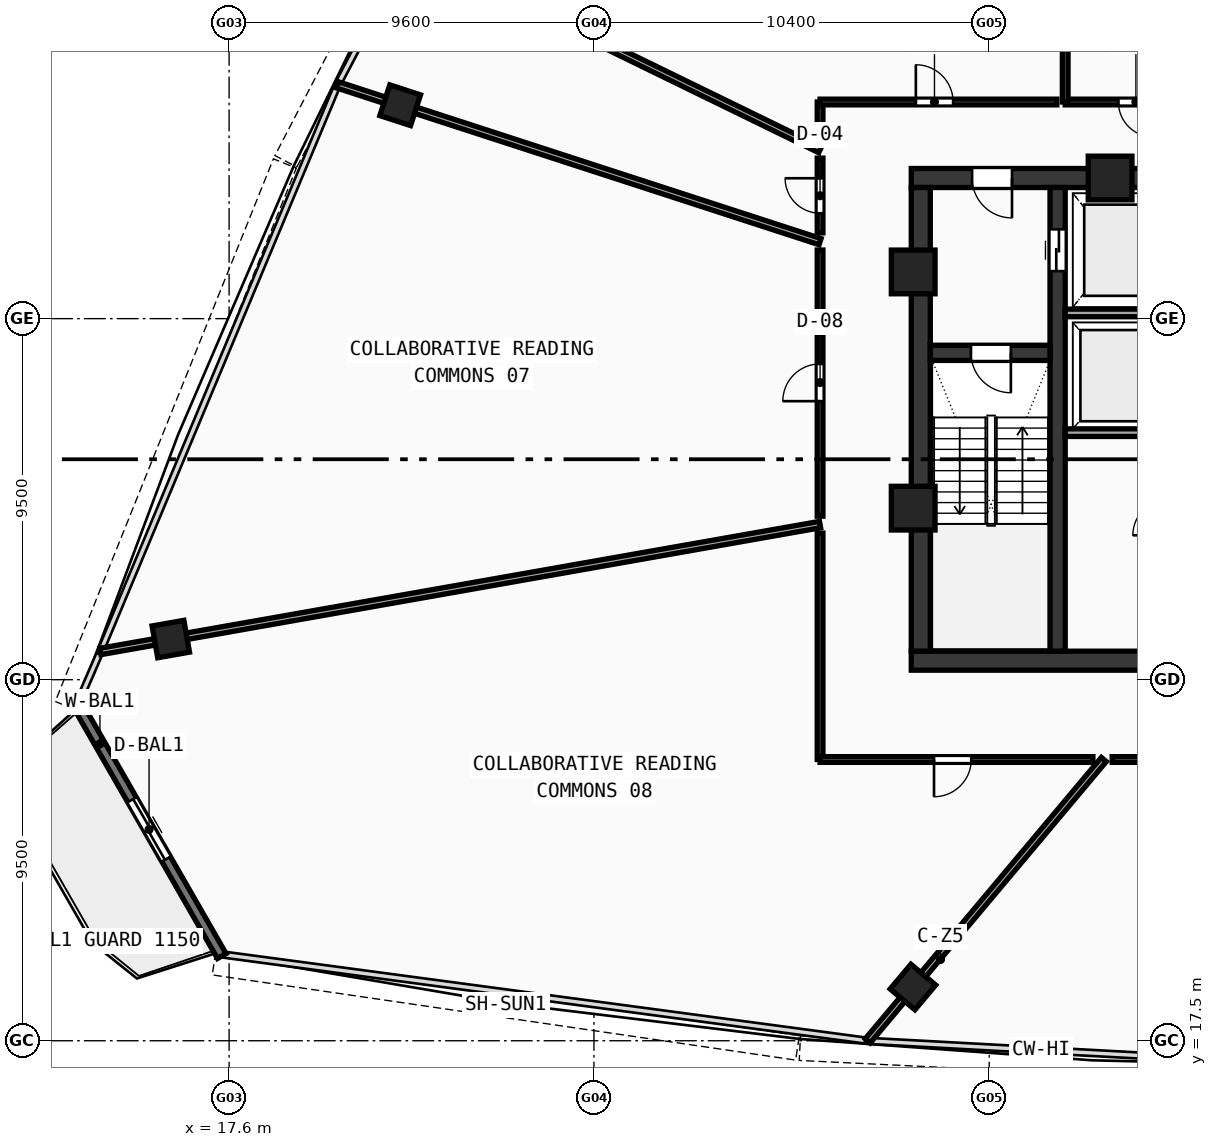
"""IFC4 building model, lengths in metres.
Left out: names, types, materials, properties, quantities, classifications, styles, units other than length and angle.
Written with IfcOpenShell. Run it as: python <this file> out.ifc"""

import sys

from ifc_helpers import new_model, si_unit, direction, frame, frame_2d, origin, origin_with_axes, origin_2d, place, context, subcontext, project, spatial, rectangle, hollow_rectangle, extrude, source, transform, mapped, element, fill, save


model = new_model("IFC4")
c1 = context("Model", 3, precision=1e-05, world=origin(), true_north=direction((0.0, 1.0)))
c2 = subcontext(c1, "Body", "Model", "MODEL_VIEW")
j1 = project(units=[si_unit("LENGTHUNIT", "METRE"), si_unit("PLANEANGLEUNIT", "RADIAN")], contexts=[c1])
p1 = place(None, origin())
s1 = spatial("IfcSite", under=j1, at=p1, CompositionType="ELEMENT")
p2 = place(p1, origin())
s2 = spatial("IfcBuilding", under=s1, at=p2, CompositionType="ELEMENT")
p3 = place(p2, frame((0.0, 0.0, 259.45)))
s3 = spatial("IfcBuildingStorey", under=s2, at=p3, CompositionType="ELEMENT", Elevation=259.45)
p4 = place(p3, frame((35.55, 27.5, 0.0), z_axis=(0.0, 0.0, 1.0), x_axis=(1.0, 0.0, 0.0)))
e1 = element("IfcWall", 1, at=p4, inside=s3, PredefinedType="SHEAR", context=c2, shape_type="SweptSolid", body=[
    extrude(rectangle(XDim=24.9, YDim=0.5, at=frame_2d((12.45, 0.0))), origin(), (0.0, 0.0, 1.0), 3.47),
])
p5 = place(p3, frame((35.55, 40.2, 0.0), z_axis=(0.0, 0.0, 1.0), x_axis=(1.0, 0.0, 0.0)))
e2 = element("IfcWall", 2, at=p5, inside=s3, PredefinedType="SHEAR", context=c2, shape_type="SweptSolid", body=[
    extrude(rectangle(XDim=11.25, YDim=0.5, at=frame_2d((5.625, 0.0))), origin(), (0.0, 0.0, 1.0), 3.47),
])
p6 = place(p5, frame((1.6, 0.0, 0.0)))
e3 = element("IfcOpeningElement", 3, at=p6, cuts=e2, PredefinedType="OPENING", context=c2, shape_type="SweptSolid", body=[
    extrude(rectangle(XDim=1.05, YDim=2.1, at=frame_2d((0.525, 1.05))), frame((0.0, 0.26, 0.0), z_axis=(0.0, -1.0, 0.0), x_axis=(1.0, 0.0, 0.0)), (0.0, 0.0, 1.0), 0.52),
])
p7 = place(p3, frame((35.8, 27.75, 0.0), z_axis=(0.0, 0.0, 1.0), x_axis=(0.0, 1.0, 0.0)))
e4 = element("IfcWall", 4, at=p7, inside=s3, PredefinedType="SHEAR", context=c2, shape_type="SweptSolid", body=[
    extrude(rectangle(XDim=12.2, YDim=0.5, at=frame_2d((6.1, 0.0))), origin(), (0.0, 0.0, 1.0), 3.47),
])
p8 = place(p3, frame((39.4, 27.75, 0.0), z_axis=(0.0, 0.0, 1.0), x_axis=(0.0, 1.0, 0.0)))
e5 = element("IfcWall", 5, at=p8, inside=s3, PredefinedType="SHEAR", context=c2, shape_type="SweptSolid", body=[
    extrude(rectangle(XDim=12.2, YDim=0.4, at=frame_2d((6.1, 0.0))), origin(), (0.0, 0.0, 1.0), 3.47),
])
p9 = place(p8, frame((10.0, 0.0, 0.0)))
e6 = element("IfcOpeningElement", 6, at=p9, cuts=e5, PredefinedType="OPENING", context=c2, shape_type="SweptSolid", body=[
    extrude(rectangle(XDim=1.1, YDim=2.1, at=frame_2d((0.55, 1.05))), frame((0.0, 0.21, 0.0), z_axis=(0.0, -1.0, 0.0), x_axis=(1.0, 0.0, 0.0)), (0.0, 0.0, 1.0), 0.42),
])
p10 = place(p3, frame((36.05, 35.6, 0.0), z_axis=(0.0, 0.0, 1.0), x_axis=(1.0, 0.0, 0.0)))
e7 = element("IfcWall", 7, at=p10, inside=s3, PredefinedType="SHEAR", context=c2, shape_type="SweptSolid", body=[
    extrude(rectangle(XDim=3.15, YDim=0.4, at=frame_2d((1.575, 0.0))), origin(), (0.0, 0.0, 1.0), 3.47),
])
p11 = place(p10, frame((1.07, 0.0, 0.0)))
e8 = element("IfcOpeningElement", 8, at=p11, cuts=e7, PredefinedType="OPENING", context=c2, shape_type="SweptSolid", body=[
    extrude(rectangle(XDim=1.05, YDim=2.1, at=frame_2d((0.525, 1.05))), frame((0.0, 0.21, 0.0), z_axis=(0.0, -1.0, 0.0), x_axis=(1.0, 0.0, 0.0)), (0.0, 0.0, 1.0), 0.42),
])
m1 = source(origin(), c2, "Body", "SweptSolid", [
    extrude(hollow_rectangle(XDim=1.15, YDim=1.15, WallThickness=0.048, at=origin_2d()), origin(), (0.0, 0.0, 1.0), 3.73),
])
for number, where, z_axis, x_axis in (
    (9, (40.781, 40.2, -0.26), (0.0, 0.0, 1.0), (1.0, 0.0, 0.0)),
    (10, (35.6, 37.729, -0.26), (0.0, 0.0, 1.0), (1.0, 0.0, 0.0)),
    (11, (35.6, 31.513, -0.26), (0.0, 0.0, 1.0), (1.0, 0.0, 0.0)),
):
    element("IfcColumn", number, at=place(p3, frame(where, z_axis=z_axis, x_axis=x_axis)), inside=s3, PredefinedType="COLUMN", context=c2, shape_type="MappedRepresentation", body=[
        mapped(m1, transform((0.0, 0.0, 0.0), scale=1.0)),
    ])
m2 = source(origin(), c2, "Body", "SweptSolid", [
    extrude(hollow_rectangle(XDim=0.85, YDim=0.85, WallThickness=0.034, at=origin_2d()), origin(), (0.0, 0.0, 1.0), 3.73),
])
for number, where, z_axis, x_axis in (
    (12, (35.593, 18.914, -0.26), (0.0, 0.0, 1.0), (0.766, -0.643, 0.0)),
    (13, (22.102, 42.115, -0.26), (0.0, 0.0, 1.0), (-0.309, -0.951, 0.0)),
    (14, (16.066, 28.069, -0.26), (0.0, 0.0, 1.0), (0.174, -0.985, 0.0)),
):
    element("IfcColumn", number, at=place(p3, frame(where, z_axis=z_axis, x_axis=x_axis)), inside=s3, PredefinedType="COLUMN", context=c2, shape_type="MappedRepresentation", body=[
        mapped(m2, transform((0.0, 0.0, 0.0), scale=1.0)),
    ])
p12 = place(p3, frame((13.581, 26.392, 0.0), z_axis=(0.0, 0.0, 1.0), x_axis=(0.497934343816, -0.867214730761, 0.0)))
e15 = element("IfcWall", 15, at=p12, inside=s3, PredefinedType="STANDARD", context=c2, shape_type="SweptSolid", body=[
    extrude(rectangle(XDim=7.684, YDim=0.26, at=frame_2d((3.842, 0.0))), origin(), (0.0, 0.0, 1.0), 3.47),
])
p13 = place(p12, frame((2.942, 0.0, 0.0)))
e16 = element("IfcOpeningElement", 16, at=p13, cuts=e15, PredefinedType="OPENING", context=c2, shape_type="SweptSolid", body=[
    extrude(rectangle(XDim=1.8, YDim=2.15, at=frame_2d((0.9, 1.075))), frame((0.0, 0.14, 0.0), z_axis=(0.0, -1.0, 0.0), x_axis=(1.0, 0.0, 0.0)), (0.0, 0.0, 1.0), 0.28),
])
for number, where, z_axis, x_axis in (
    (17, (39.6, 36.65, 0.0), (0.0, 0.0, 1.0), (1.0, 0.0, 0.0)),
    (18, (39.6, 33.5, 0.0), (0.0, 0.0, 1.0), (1.0, 0.0, 0.0)),
):
    element("IfcWall", number, at=place(p3, frame(where, z_axis=z_axis, x_axis=x_axis)), inside=s3, PredefinedType="SOLIDWALL", context=c2, shape_type="SweptSolid", body=[
        extrude(rectangle(XDim=2.72, YDim=0.2, at=frame_2d((1.36, 0.0))), origin(), (0.0, 0.0, 1.0), 3.47),
    ])
p14 = place(p3, frame((39.6, 42.2, 0.0), z_axis=(0.0, 0.0, 1.0), x_axis=(1.0, 0.0, 0.0)))
e19 = element("IfcWall", 19, at=p14, inside=s3, PredefinedType="PARTITIONING", context=c2, shape_type="SweptSolid", body=[
    extrude(rectangle(XDim=4.35, YDim=0.15, at=frame_2d((2.175, 0.0))), origin(), (0.0, 0.0, 1.0), 3.47),
])
p15 = place(p14, frame((1.4, 0.0, 0.0)))
e20 = element("IfcOpeningElement", 20, at=p15, cuts=e19, PredefinedType="OPENING", context=c2, shape_type="SweptSolid", body=[
    extrude(rectangle(XDim=0.92, YDim=2.1, at=frame_2d((0.46, 1.05))), frame((0.0, 0.085, 0.0), z_axis=(0.0, -1.0, 0.0), x_axis=(1.0, 0.0, 0.0)), (0.0, 0.0, 1.0), 0.17),
])
p16 = place(p3, frame((39.6, 42.2, 0.0), z_axis=(0.0, 0.0, 1.0), x_axis=(0.0, 1.0, 0.0)))
e21 = element("IfcWall", 21, at=p16, inside=s3, PredefinedType="PARTITIONING", context=c2, shape_type="SweptSolid", body=[
    extrude(rectangle(XDim=4.0, YDim=0.15, at=frame_2d((2.0, 0.0))), origin(), (0.0, 0.0, 1.0), 3.47),
])
p17 = place(p3, frame((33.15, 40.943, 0.0), z_axis=(0.0, 0.0, 1.0), x_axis=(-0.89879494126, 0.438369311842, 0.0)))
e22 = element("IfcWall", 22, at=p17, inside=s3, PredefinedType="PARTITIONING", context=c2, shape_type="SweptSolid", body=[
    extrude(rectangle(XDim=12.043, YDim=0.17, at=frame_2d((6.021, 0.0))), origin(), (0.0, 0.0, 1.0), 2.82),
])
p18 = place(p3, frame((33.15, 38.525, 0.0), z_axis=(0.0, 0.0, 1.0), x_axis=(-0.951055435747, 0.30902031994, 0.0)))
e23 = element("IfcWall", 23, at=p18, inside=s3, PredefinedType="PARTITIONING", context=c2, shape_type="SweptSolid", body=[
    extrude(rectangle(XDim=13.349, YDim=0.17, at=frame_2d((6.675, 0.0))), origin(), (0.0, 0.0, 1.0), 2.82),
])
p19 = place(p3, frame((33.15, 31.082, 0.0), z_axis=(0.0, 0.0, 1.0), x_axis=(-0.984808346381, -0.173644812474, 0.0)))
e24 = element("IfcWall", 24, at=p19, inside=s3, PredefinedType="PARTITIONING", context=c2, shape_type="SweptSolid", body=[
    extrude(rectangle(XDim=19.228, YDim=0.17, at=frame_2d((9.614, 0.0))), origin(), (0.0, 0.0, 1.0), 2.82),
])
p20 = place(p3, frame((40.616, 24.9, 0.0), z_axis=(0.0, 0.0, 1.0), x_axis=(-0.642795010628, -0.766038232931, 0.0)))
e25 = element("IfcWall", 25, at=p20, inside=s3, PredefinedType="PARTITIONING", context=c2, shape_type="SweptSolid", body=[
    extrude(rectangle(XDim=9.663, YDim=0.17, at=frame_2d((4.832, 0.0))), origin(), (0.0, 0.0, 1.0), 2.82),
])
p21 = place(p3, frame((33.15, 24.9, 0.0), z_axis=(0.0, 0.0, 1.0), x_axis=(0.0, 1.0, 0.0)))
e26 = element("IfcWall", 26, at=p21, inside=s3, PredefinedType="PARTITIONING", context=c2, shape_type="SweptSolid", body=[
    extrude(rectangle(XDim=5.958, YDim=0.15, at=frame_2d((2.979, 0.0))), origin(), (0.0, 0.0, 1.0), 3.12),
])
p22 = place(p3, frame((33.15, 31.301, 0.0), z_axis=(0.0, 0.0, 1.0), x_axis=(0.0, 1.0, 0.0)))
e27 = element("IfcWall", 27, at=p22, inside=s3, PredefinedType="PARTITIONING", context=c2, shape_type="SweptSolid", body=[
    extrude(rectangle(XDim=7.004, YDim=0.15, at=frame_2d((3.502, 0.0))), origin(), (0.0, 0.0, 1.0), 3.47),
])
p23 = place(p22, frame((3.027, 0.0, 0.0)))
e28 = element("IfcOpeningElement", 28, at=p23, cuts=e27, PredefinedType="OPENING", context=c2, shape_type="SweptSolid", body=[
    extrude(rectangle(XDim=0.98, YDim=2.12, at=frame_2d((0.49, 1.06))), frame((0.0, 0.085, 0.0), z_axis=(0.0, -1.0, 0.0), x_axis=(1.0, 0.0, 0.0)), (0.0, 0.0, 1.0), 0.17),
])
p24 = place(p3, frame((33.15, 38.756, 0.0), z_axis=(0.0, 0.0, 1.0), x_axis=(0.0, 1.0, 0.0)))
e29 = element("IfcWall", 29, at=p24, inside=s3, PredefinedType="PARTITIONING", context=c2, shape_type="SweptSolid", body=[
    extrude(rectangle(XDim=1.967, YDim=0.15, at=frame_2d((0.983, 0.0))), origin(), (0.0, 0.0, 1.0), 3.47),
])
p25 = place(p24, frame((0.518, 0.0, 0.0)))
e30 = element("IfcOpeningElement", 30, at=p25, cuts=e29, PredefinedType="OPENING", context=c2, shape_type="SweptSolid", body=[
    extrude(rectangle(XDim=0.92, YDim=2.1, at=frame_2d((0.46, 1.05))), frame((0.0, 0.085, 0.0), z_axis=(0.0, -1.0, 0.0), x_axis=(1.0, 0.0, 0.0)), (0.0, 0.0, 1.0), 0.17),
])
p26 = place(p3, frame((33.15, 41.188, 0.0), z_axis=(0.0, 0.0, 1.0), x_axis=(0.0, 1.0, 0.0)))
e31 = element("IfcWall", 31, at=p26, inside=s3, PredefinedType="PARTITIONING", context=c2, shape_type="SweptSolid", body=[
    extrude(rectangle(XDim=1.012, YDim=0.15, at=frame_2d((0.506, 0.0))), origin(), (0.0, 0.0, 1.0), 3.12),
])
p27 = place(p3, frame((33.15, 42.2, 0.0), z_axis=(0.0, 0.0, 1.0), x_axis=(1.0, 0.0, 0.0)))
e32 = element("IfcWall", 32, at=p27, inside=s3, PredefinedType="PARTITIONING", context=c2, shape_type="SweptSolid", body=[
    extrude(rectangle(XDim=6.23, YDim=0.15, at=frame_2d((3.115, 0.0))), origin(), (0.0, 0.0, 1.0), 2.82),
])
p28 = place(p27, frame((2.52, 0.0, 0.0)))
e33 = element("IfcOpeningElement", 33, at=p28, cuts=e32, PredefinedType="OPENING", context=c2, shape_type="SweptSolid", body=[
    extrude(rectangle(XDim=0.98, YDim=2.12, at=frame_2d((0.49, 1.06))), frame((0.0, 0.085, 0.0), z_axis=(0.0, -1.0, 0.0), x_axis=(1.0, 0.0, 0.0)), (0.0, 0.0, 1.0), 0.17),
])
p29 = place(p3, frame((45.414, 24.9, 0.0), z_axis=(0.0, 0.0, 1.0), x_axis=(-1.0, 0.0, 0.0)))
e34 = element("IfcWall", 34, at=p29, inside=s3, PredefinedType="PARTITIONING", context=c2, shape_type="SweptSolid", body=[
    extrude(rectangle(XDim=4.579, YDim=0.15, at=frame_2d((2.289, 0.0))), origin(), (0.0, 0.0, 1.0), 2.82),
])
p30 = place(p29, frame((1.81, 0.0, 0.0)))
e35 = element("IfcOpeningElement", 35, at=p30, cuts=e34, PredefinedType="OPENING", context=c2, shape_type="SweptSolid", body=[
    extrude(rectangle(XDim=0.98, YDim=2.12, at=frame_2d((0.49, 1.06))), frame((0.0, 0.085, 0.0), z_axis=(0.0, -1.0, 0.0), x_axis=(1.0, 0.0, 0.0)), (0.0, 0.0, 1.0), 0.17),
])
p31 = place(p3, frame((40.329, 24.9, 0.0), z_axis=(0.0, 0.0, 1.0), x_axis=(-1.0, 0.0, 0.0)))
e36 = element("IfcWall", 36, at=p31, inside=s3, PredefinedType="PARTITIONING", context=c2, shape_type="SweptSolid", body=[
    extrude(rectangle(XDim=7.179, YDim=0.15, at=frame_2d((3.589, 0.0))), origin(), (0.0, 0.0, 1.0), 3.12),
])
p32 = place(p31, frame((3.201, 0.0, 0.0)))
e37 = element("IfcOpeningElement", 37, at=p32, cuts=e36, PredefinedType="OPENING", context=c2, shape_type="SweptSolid", body=[
    extrude(rectangle(XDim=0.98, YDim=2.12, at=frame_2d((0.49, 1.06))), frame((0.0, 0.085, 0.0), z_axis=(0.0, -1.0, 0.0), x_axis=(1.0, 0.0, 0.0)), (0.0, 0.0, 1.0), 0.17),
])
m3 = source(origin(), c2, "Body", "SweptSolid", [
    extrude(rectangle(XDim=1.8, YDim=2.15, at=frame_2d((0.9, 1.075))), frame((0.0, 0.025, 0.0), z_axis=(0.0, -1.0, 0.0), x_axis=(1.0, 0.0, 0.0)), (0.0, 0.0, 1.0), 0.05),
])
p33 = place(p13, origin_with_axes())
e38 = element("IfcDoor", 38, at=p33, inside=s3, OperationType="DOUBLE_DOOR_SLIDING", PredefinedType="DOOR", context=c2, shape_type="MappedRepresentation", body=[
    mapped(m3, transform((0.0, 0.0, 0.0), scale=1.0)),
])
fill(e16, e38)
m4 = source(origin(), c2, "Body", "SweptSolid", [
    extrude(rectangle(XDim=1.05, YDim=2.1, at=frame_2d((0.525, 1.05))), frame((0.0, 0.025, 0.0), z_axis=(0.0, -1.0, 0.0), x_axis=(1.0, 0.0, 0.0)), (0.0, 0.0, 1.0), 0.05),
])
p34 = place(p11, frame((1.05, 0.0, 0.0), z_axis=(0.0, 0.0, 1.0), x_axis=(-1.0, 0.0, 0.0)))
e39 = element("IfcDoor", 39, at=p34, inside=s3, OperationType="SINGLE_SWING_LEFT", PredefinedType="DOOR", context=c2, shape_type="MappedRepresentation", body=[
    mapped(m4, transform((0.0, 0.0, 0.0), scale=1.0)),
])
fill(e8, e39)
p35 = place(p6, frame((1.05, 0.0, 0.0), z_axis=(0.0, 0.0, 1.0), x_axis=(-1.0, 0.0, 0.0)))
e40 = element("IfcDoor", 40, at=p35, inside=s3, OperationType="SINGLE_SWING_LEFT", PredefinedType="DOOR", context=c2, shape_type="MappedRepresentation", body=[
    mapped(m4, transform((0.0, 0.0, 0.0), scale=1.0)),
])
fill(e3, e40)
m5 = source(origin(), c2, "Body", "SweptSolid", [
    extrude(rectangle(XDim=1.1, YDim=2.1, at=frame_2d((0.55, 1.05))), frame((0.0, 0.025, 0.0), z_axis=(0.0, -1.0, 0.0), x_axis=(1.0, 0.0, 0.0)), (0.0, 0.0, 1.0), 0.05),
])
p36 = place(p9, frame((1.1, 0.0, 0.0), z_axis=(0.0, 0.0, 1.0), x_axis=(-1.0, 0.0, 0.0)))
e41 = element("IfcDoor", 41, at=p36, inside=s3, OperationType="DOUBLE_DOOR_SLIDING", PredefinedType="DOOR", context=c2, shape_type="MappedRepresentation", body=[
    mapped(m5, transform((0.0, 0.0, 0.0), scale=1.0)),
])
fill(e6, e41)
m6 = source(origin(), c2, "Body", "SweptSolid", [
    extrude(rectangle(XDim=0.92, YDim=2.1, at=frame_2d((0.46, 1.05))), frame((0.0, 0.025, 0.0), z_axis=(0.0, -1.0, 0.0), x_axis=(1.0, 0.0, 0.0)), (0.0, 0.0, 1.0), 0.05),
])
p37 = place(p15, frame((0.92, 0.0, 0.0), z_axis=(0.0, 0.0, 1.0), x_axis=(-1.0, 0.0, 0.0)))
e42 = element("IfcDoor", 42, at=p37, inside=s3, OperationType="SINGLE_SWING_LEFT", PredefinedType="DOOR", context=c2, shape_type="MappedRepresentation", body=[
    mapped(m6, transform((0.0, 0.0, 0.0), scale=1.0)),
])
fill(e20, e42)
m7 = source(origin(), c2, "Body", "SweptSolid", [
    extrude(rectangle(XDim=0.98, YDim=2.12, at=frame_2d((0.49, 1.06))), frame((0.0, 0.025, 0.0), z_axis=(0.0, -1.0, 0.0), x_axis=(1.0, 0.0, 0.0)), (0.0, 0.0, 1.0), 0.05),
])
p38 = place(p28, origin_with_axes())
e43 = element("IfcDoor", 43, at=p38, inside=s3, OperationType="SINGLE_SWING_LEFT", PredefinedType="DOOR", context=c2, shape_type="MappedRepresentation", body=[
    mapped(m7, transform((0.0, 0.0, 0.0), scale=1.0)),
])
fill(e33, e43)
p39 = place(p25, origin_with_axes())
e44 = element("IfcDoor", 44, at=p39, inside=s3, OperationType="SINGLE_SWING_RIGHT", PredefinedType="DOOR", context=c2, shape_type="MappedRepresentation", body=[
    mapped(m6, transform((0.0, 0.0, 0.0), scale=1.0)),
])
fill(e30, e44)
p40 = place(p23, origin_with_axes())
e45 = element("IfcDoor", 45, at=p40, inside=s3, OperationType="SINGLE_SWING_LEFT", PredefinedType="DOOR", context=c2, shape_type="MappedRepresentation", body=[
    mapped(m7, transform((0.0, 0.0, 0.0), scale=1.0)),
])
fill(e28, e45)
p41 = place(p32, origin_with_axes())
e46 = element("IfcDoor", 46, at=p41, inside=s3, OperationType="SINGLE_SWING_RIGHT", PredefinedType="DOOR", context=c2, shape_type="MappedRepresentation", body=[
    mapped(m7, transform((0.0, 0.0, 0.0), scale=1.0)),
])
fill(e37, e46)
save(model, sys.argv[1])
